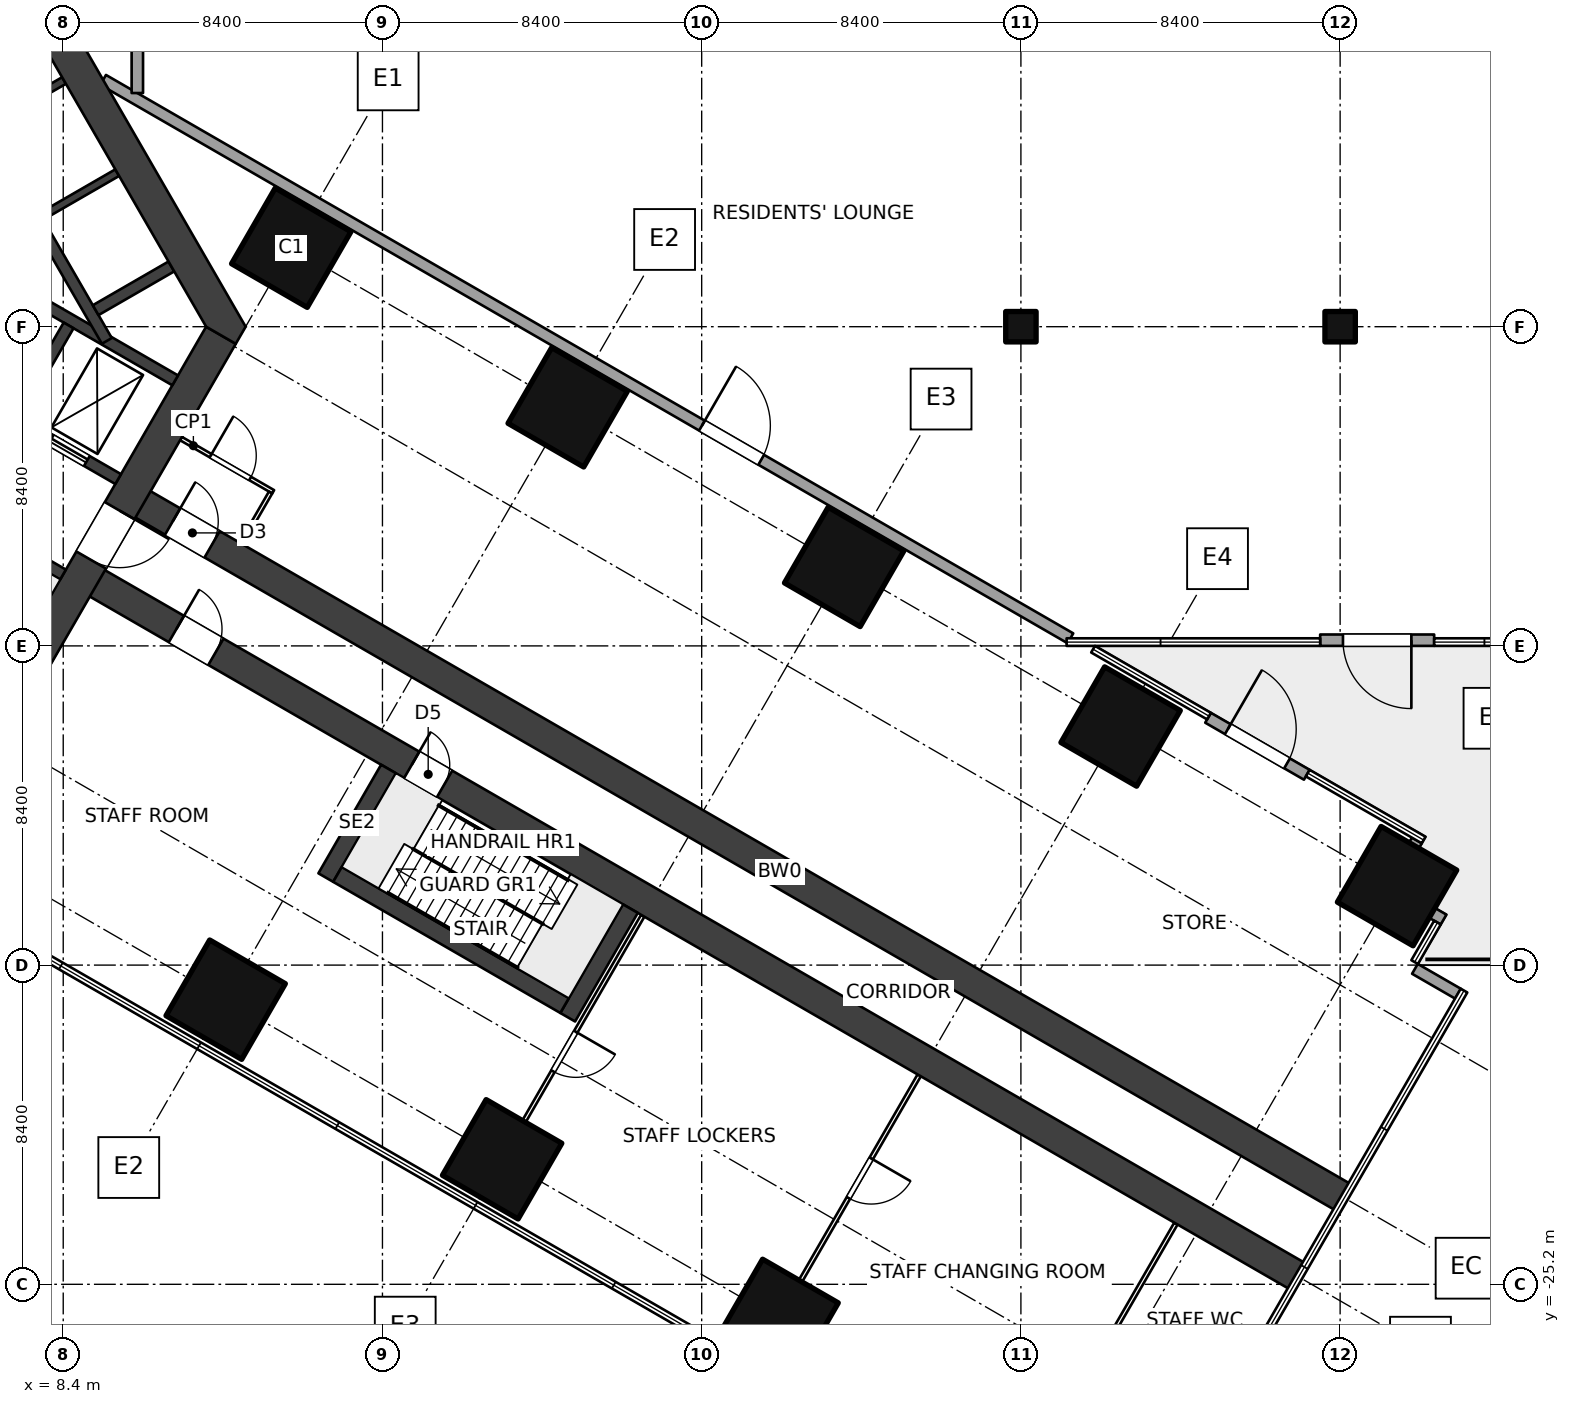
"""IFC4 building model, lengths in metres.
Left out: names, types, materials, properties, quantities, classifications, styles, units other than length and angle.
Written with IfcOpenShell. Run it as: python <this file> out.ifc"""

import sys

from ifc_helpers import new_model, si_unit, direction, frame, frame_2d, origin, origin_2d, place, context, subcontext, project, spatial, polyline, rectangle, outline, extrude, element, fill, save


model = new_model("IFC4")
c1 = context("Model", 3, precision=1e-05, world=origin(), true_north=direction((0.0, 1.0)))
c2 = subcontext(c1, "Body", "Model", "MODEL_VIEW")
j1 = project(units=[si_unit("LENGTHUNIT", "METRE"), si_unit("PLANEANGLEUNIT", "RADIAN")], contexts=[c1])
p1 = place(None, origin())
s1 = spatial("IfcSite", under=j1, at=p1, CompositionType="ELEMENT")
p2 = place(p1, origin())
s2 = spatial("IfcBuilding", under=s1, at=p2, CompositionType="ELEMENT")
p3 = place(p2, frame((0.0, 0.0, 21.0)))
s3 = spatial("IfcBuildingStorey", under=s2, at=p3, CompositionType="ELEMENT", Elevation=21.0)
for number, where, z_axis, x_axis in (
    (1, (14.4, 2.078, 0.0), (0.0, 0.0, 1.0), (-0.5, -0.866, 0.0)),
    (2, (21.675, -2.122, 0.0), (0.0, 0.0, 1.0), (-0.5, -0.866, 0.0)),
    (3, (12.675, -17.71, 0.0), (0.0, 0.0, 1.0), (-0.5, -0.866, 0.0)),
    (4, (28.949, -6.322, 0.0), (0.0, 0.0, 1.0), (-0.5, -0.866, 0.0)),
    (5, (19.949, -21.91, 0.0), (0.0, 0.0, 1.0), (-0.5, -0.866, 0.0)),
    (6, (36.224, -10.521, 0.0), (0.0, 0.0, 1.0), (-0.5, -0.866, 0.0)),
    (7, (27.224, -26.11, 0.0), (0.0, 0.0, 1.0), (-0.5, -0.866, 0.0)),
    (8, (43.499, -14.721, 0.0), (0.0, 0.0, 1.0), (-0.5, -0.866, 0.0)),
):
    element("IfcColumn", number, at=place(p3, frame(where, z_axis=z_axis, x_axis=x_axis)), inside=s3, PredefinedType="COLUMN", context=c2, shape_type="SweptSolid", body=[
        extrude(rectangle(XDim=2.3, YDim=2.3, at=origin_2d()), origin(), (0.0, 0.0, 1.0), 5.0),
    ])
for number, where, z_axis, x_axis in (
    (9, (33.6, 0.0, 0.0), (0.0, 0.0, 1.0), (1.0, 0.0, 0.0)),
    (10, (42.0, 0.0, 0.0), (0.0, 0.0, 1.0), (1.0, 0.0, 0.0)),
):
    element("IfcColumn", number, at=place(p3, frame(where, z_axis=z_axis, x_axis=x_axis)), inside=s3, PredefinedType="COLUMN", context=c2, shape_type="SweptSolid", body=[
        extrude(rectangle(XDim=0.8, YDim=0.8, at=origin_2d()), origin(), (0.0, 0.0, 1.0), 5.0),
    ])
p4 = place(p3, frame((12.551, -0.225, 0.0), z_axis=(0.0, 0.0, 1.0), x_axis=(-0.499997612506, -0.8660267822, 0.0)))
e11 = element("IfcWall", 11, at=p4, inside=s3, PredefinedType="SHEAR", context=c2, shape_type="SweptSolid", body=[
    extrude(rectangle(XDim=12.161, YDim=0.9, at=frame_2d((6.08, 0.0))), origin(), (0.0, 0.0, 1.0), 5.0),
])
p5 = place(p4, frame((5.33, 0.0, 0.0)))
e12 = element("IfcOpeningElement", 12, at=p5, cuts=e11, PredefinedType="OPENING", context=c2, shape_type="SweptSolid", body=[
    extrude(rectangle(XDim=1.5, YDim=2.1, at=frame_2d((0.75, 1.05))), frame((0.0, 0.46, 0.0), z_axis=(0.0, -1.0, 0.0), x_axis=(1.0, 0.0, 0.0)), (0.0, 0.0, 1.0), 0.92),
])
p6 = place(p3, origin())
e13 = element("IfcWall", 13, at=p6, inside=s3, PredefinedType="SHEAR", context=c2, shape_type="SweptSolid", body=[
    extrude(outline(polyline([(13.2, 0.0), (6.6, 11.432), (6.08, 11.432), (6.08, 10.531), (12.161, 0.0), (12.94, -0.45), (13.2, 0.0)])), origin(), (0.0, 0.0, 1.0), 5.0),
])
p7 = place(p3, frame((2.419, -3.071, 0.0), z_axis=(0.0, 0.0, 1.0), x_axis=(0.86602711848, -0.499997030048, 0.0)))
e14 = element("IfcWall", 14, at=p7, inside=s3, PredefinedType="SHEAR", context=c2, shape_type="SweptSolid", body=[
    extrude(rectangle(XDim=6.901, YDim=0.3, at=frame_2d((3.451, 0.0))), origin(), (0.0, 0.0, 1.0), 5.0),
])
p8 = place(p7, frame((0.25, 0.0, 0.0)))
e15 = element("IfcOpeningElement", 15, at=p8, cuts=e14, PredefinedType="OPENING", context=c2, shape_type="SweptSolid", body=[
    extrude(rectangle(XDim=1.0, YDim=2.1, at=frame_2d((0.5, 1.05))), frame((0.0, 0.16, 0.0), z_axis=(0.0, -1.0, 0.0), x_axis=(1.0, 0.0, 0.0)), (0.0, 0.0, 1.0), 0.32),
])
p9 = place(p3, frame((3.869, -0.559, 0.0), z_axis=(0.0, 0.0, 1.0), x_axis=(0.86602711848, -0.499997030048, 0.0)))
e16 = element("IfcWall", 16, at=p9, inside=s3, PredefinedType="SHEAR", context=c2, shape_type="SweptSolid", body=[
    extrude(rectangle(XDim=6.901, YDim=0.3, at=frame_2d((3.451, 0.0))), origin(), (0.0, 0.0, 1.0), 5.0),
])
p10 = place(p9, frame((4.85, 0.0, 0.0)))
e17 = element("IfcOpeningElement", 17, at=p10, cuts=e16, PredefinedType="OPENING", context=c2, shape_type="SweptSolid", body=[
    extrude(rectangle(XDim=1.1, YDim=2.1, at=frame_2d((0.55, 1.05))), frame((0.0, 0.16, 0.0), z_axis=(0.0, -1.0, 0.0), x_axis=(1.0, 0.0, 0.0)), (0.0, 0.0, 1.0), 0.32),
])
p11 = place(p3, frame((5.369, 2.039, 0.0), z_axis=(0.0, 0.0, 1.0), x_axis=(0.86602711848, -0.499997030048, 0.0)))
e18 = element("IfcWall", 18, at=p11, inside=s3, PredefinedType="SHEAR", context=c2, shape_type="SweptSolid", body=[
    extrude(rectangle(XDim=6.901, YDim=0.3, at=frame_2d((3.451, 0.0))), origin(), (0.0, 0.0, 1.0), 5.0),
])
p12 = place(p3, frame((8.541, 0.034, 0.0), z_axis=(0.0, 0.0, 1.0), x_axis=(-0.50000943426, -0.866019956843, 0.0)))
e19 = element("IfcWall", 19, at=p12, inside=s3, PredefinedType="SHEAR", context=c2, shape_type="SweptSolid", body=[
    extrude(rectangle(XDim=2.7, YDim=0.3, at=frame_2d((1.35, 0.0))), origin(), (0.0, 0.0, 1.0), 5.0),
])
p13 = place(p3, frame((4.45, 8.455, 0.0), z_axis=(0.0, 0.0, 1.0), x_axis=(0.500002290144, -0.866024081565, 0.0)))
e20 = element("IfcWall", 20, at=p13, inside=s3, PredefinedType="SHEAR", context=c2, shape_type="SweptSolid", body=[
    extrude(rectangle(XDim=10.195, YDim=0.3, at=frame_2d((5.098, 0.0))), origin(), (0.0, 0.0, 1.0), 5.0),
])
p14 = place(p3, frame((9.254, 0.435, 0.0), z_axis=(0.0, 0.0, 1.0), x_axis=(0.866007057882, 0.500031774688, 0.0)))
e21 = element("IfcWall", 21, at=p14, inside=s3, PredefinedType="SHEAR", context=c2, shape_type="SweptSolid", body=[
    extrude(rectangle(XDim=2.3, YDim=0.3, at=frame_2d((1.15, 0.0))), origin(), (0.0, 0.0, 1.0), 5.0),
])
for number, where, z_axis, x_axis in (
    (22, (6.429, 5.328, 0.0), (0.0, 0.0, 1.0), (0.866, 0.5, 0.0)),
    (23, (7.829, 2.903, 0.0), (0.0, 0.0, 1.0), (0.866, 0.5, 0.0)),
):
    element("IfcWall", number, at=place(p3, frame(where, z_axis=z_axis, x_axis=x_axis)), inside=s3, PredefinedType="SHEAR", context=c2, shape_type="SweptSolid", body=[
        extrude(rectangle(XDim=2.3, YDim=0.2, at=frame_2d((1.15, 0.0))), origin(), (0.0, 0.0, 1.0), 5.0),
    ])
p15 = place(p3, frame((10.11, -4.451, 0.0), z_axis=(0.0, 0.0, 1.0), x_axis=(0.866023348156, -0.500003560437, 0.0)))
e24 = element("IfcWall", 24, at=p15, inside=s3, PredefinedType="SHEAR", context=c2, shape_type="SweptSolid", body=[
    extrude(rectangle(XDim=36.888, YDim=0.8, at=frame_2d((18.444, 0.0))), origin(), (0.0, 0.0, 1.0), 5.0),
])
p16 = place(p15, frame((1.35, 0.0, 0.0)))
e25 = element("IfcOpeningElement", 25, at=p16, cuts=e24, PredefinedType="OPENING", context=c2, shape_type="SweptSolid", body=[
    extrude(rectangle(XDim=1.2, YDim=2.1, at=frame_2d((0.6, 1.05))), frame((0.0, 0.41, 0.0), z_axis=(0.0, -1.0, 0.0), x_axis=(1.0, 0.0, 0.0)), (0.0, 0.0, 1.0), 0.82),
])
p17 = place(p3, frame((8.91, -6.53, 0.0), z_axis=(0.0, 0.0, 1.0), x_axis=(0.866026214035, -0.499998596603, 0.0)))
e26 = element("IfcWall", 26, at=p17, inside=s3, PredefinedType="SHEAR", context=c2, shape_type="SweptSolid", body=[
    extrude(rectangle(XDim=36.888, YDim=0.8, at=frame_2d((18.444, 0.0))), origin(), (0.0, 0.0, 1.0), 5.0),
])
p18 = place(p17, frame((10.0, 0.0, 0.0)))
e27 = element("IfcOpeningElement", 27, at=p18, cuts=e26, PredefinedType="OPENING", context=c2, shape_type="SweptSolid", body=[
    extrude(rectangle(XDim=1.0, YDim=2.1, at=frame_2d((0.5, 1.05))), frame((0.0, 0.41, 0.0), z_axis=(0.0, -1.0, 0.0), x_axis=(1.0, 0.0, 0.0)), (0.0, 0.0, 1.0), 0.82),
])
p19 = place(p17, frame((2.85, 0.0, 0.0)))
e28 = element("IfcOpeningElement", 28, at=p19, cuts=e26, PredefinedType="OPENING", context=c2, shape_type="SweptSolid", body=[
    extrude(rectangle(XDim=1.2, YDim=2.1, at=frame_2d((0.6, 1.05))), frame((0.0, 0.41, 0.0), z_axis=(0.0, -1.0, 0.0), x_axis=(1.0, 0.0, 0.0)), (0.0, 0.0, 1.0), 0.82),
])
p20 = place(p3, frame((44.475, -8.25, 0.0), z_axis=(0.0, 0.0, 1.0), x_axis=(-1.0, 0.0, 0.0)))
e29 = element("IfcWall", 29, at=p20, inside=s3, PredefinedType="SOLIDWALL", context=c2, shape_type="SweptSolid", body=[
    extrude(rectangle(XDim=3.0, YDim=0.3, at=frame_2d((1.5, 0.0))), origin(), (0.0, 0.0, 1.0), 4.6),
])
p21 = place(p20, frame((0.6, 0.0, 0.0)))
e30 = element("IfcOpeningElement", 30, at=p21, cuts=e29, PredefinedType="OPENING", context=c2, shape_type="SweptSolid", body=[
    extrude(rectangle(XDim=1.8, YDim=2.4, at=frame_2d((0.9, 1.2))), frame((0.0, 0.16, 0.0), z_axis=(0.0, -1.0, 0.0), x_axis=(1.0, 0.0, 0.0)), (0.0, 0.0, 1.0), 0.32),
])
p22 = place(p3, frame((38.525, -10.291, 0.0), z_axis=(0.0, 0.0, 1.0), x_axis=(0.866010750942, -0.50002537861, 0.0)))
e31 = element("IfcWall", 31, at=p22, inside=s3, PredefinedType="SOLIDWALL", context=c2, shape_type="SweptSolid", body=[
    extrude(rectangle(XDim=3.0, YDim=0.3, at=frame_2d((1.5, 0.0))), origin(), (0.0, 0.0, 1.0), 4.6),
])
p23 = place(p22, frame((0.6, 0.0, 0.0)))
e32 = element("IfcOpeningElement", 32, at=p23, cuts=e31, PredefinedType="OPENING", context=c2, shape_type="SweptSolid", body=[
    extrude(rectangle(XDim=1.8, YDim=2.4, at=frame_2d((0.9, 1.2))), frame((0.0, 0.16, 0.0), z_axis=(0.0, -1.0, 0.0), x_axis=(1.0, 0.0, 0.0)), (0.0, 0.0, 1.0), 0.32),
])
p24 = place(p3, frame((44.021, -13.516, 0.0), z_axis=(0.0, 0.0, 1.0), x_axis=(-0.499953773667, -0.866052090925, 0.0)))
e33 = element("IfcWall", 33, at=p24, inside=s3, PredefinedType="SOLIDWALL", context=c2, shape_type="SweptSolid", body=[
    extrude(rectangle(XDim=1.005, YDim=0.3, at=frame_2d((0.502, 0.0))), origin(), (0.0, 0.0, 1.0), 4.6),
])
p25 = place(p3, frame((44.422, -15.428, 0.0), z_axis=(0.0, 0.0, 1.0), x_axis=(0.865939549016, -0.500148675346, 0.0)))
e34 = element("IfcWall", 34, at=p25, inside=s3, PredefinedType="SOLIDWALL", context=c2, shape_type="SweptSolid", body=[
    extrude(rectangle(XDim=0.347, YDim=0.3, at=frame_2d((0.174, 0.0))), origin(), (0.0, 0.0, 1.0), 4.6),
])
p26 = place(p3, frame((43.968, -16.898, 0.0), z_axis=(0.0, 0.0, 1.0), x_axis=(0.865974499684, -0.500088158126, 0.0)))
e35 = element("IfcWall", 35, at=p26, inside=s3, PredefinedType="SOLIDWALL", context=c2, shape_type="SweptSolid", body=[
    extrude(rectangle(XDim=1.31, YDim=0.3, at=frame_2d((0.655, 0.0))), origin(), (0.0, 0.0, 1.0), 4.6),
])
p27 = place(p3, frame((11.5, -2.945, 0.0), z_axis=(0.0, 0.0, 1.0), x_axis=(0.866034573852, -0.49998411664, 0.0)))
e36 = element("IfcWall", 36, at=p27, inside=s3, PredefinedType="PARTITIONING", context=c2, shape_type="SweptSolid", body=[
    extrude(rectangle(XDim=2.8, YDim=0.1, at=frame_2d((1.4, 0.0))), origin(), (0.0, 0.0, 1.0), 4.6),
])
p28 = place(p27, frame((0.9, 0.0, 0.0)))
e37 = element("IfcOpeningElement", 37, at=p28, cuts=e36, PredefinedType="OPENING", context=c2, shape_type="SweptSolid", body=[
    extrude(rectangle(XDim=1.2, YDim=2.1, at=frame_2d((0.6, 1.05))), frame((0.0, 0.06, 0.0), z_axis=(0.0, -1.0, 0.0), x_axis=(1.0, 0.0, 0.0)), (0.0, 0.0, 1.0), 0.12),
])
p29 = place(p3, frame((13.082, -5.705, 0.0), z_axis=(0.0, 0.0, 1.0), x_axis=(0.500086022567, 0.865975732936, 0.0)))
e38 = element("IfcWall", 38, at=p29, inside=s3, PredefinedType="PARTITIONING", context=c2, shape_type="SweptSolid", body=[
    extrude(rectangle(XDim=1.55, YDim=0.1, at=frame_2d((0.775, 0.0))), origin(), (0.0, 0.0, 1.0), 4.6),
])
p30 = place(p3, frame((23.649, -15.501, 0.0), z_axis=(0.0, 0.0, 1.0), x_axis=(-0.500004234368, -0.866022959057, 0.0)))
e39 = element("IfcWall", 39, at=p30, inside=s3, PredefinedType="PARTITIONING", context=c2, shape_type="SweptSolid", body=[
    extrude(rectangle(XDim=6.25, YDim=0.1, at=frame_2d((3.125, 0.0))), origin(), (0.0, 0.0, 1.0), 2.8),
])
p31 = place(p30, frame((3.525, 0.0, 0.0)))
e40 = element("IfcOpeningElement", 40, at=p31, cuts=e39, PredefinedType="OPENING", context=c2, shape_type="SweptSolid", body=[
    extrude(rectangle(XDim=1.2, YDim=2.1, at=frame_2d((0.6, 1.05))), frame((0.0, 0.06, 0.0), z_axis=(0.0, -1.0, 0.0), x_axis=(1.0, 0.0, 0.0)), (0.0, 0.0, 1.0), 0.12),
])
p32 = place(p3, frame((30.924, -19.701, 0.0), z_axis=(0.0, 0.0, 1.0), x_axis=(-0.500004234368, -0.866022959057, 0.0)))
e41 = element("IfcWall", 41, at=p32, inside=s3, PredefinedType="PARTITIONING", context=c2, shape_type="SweptSolid", body=[
    extrude(rectangle(XDim=6.25, YDim=0.1, at=frame_2d((3.125, 0.0))), origin(), (0.0, 0.0, 1.0), 2.8),
])
p33 = place(p32, frame((2.525, 0.0, 0.0)))
e42 = element("IfcOpeningElement", 42, at=p33, cuts=e41, PredefinedType="OPENING", context=c2, shape_type="SweptSolid", body=[
    extrude(rectangle(XDim=1.2, YDim=2.1, at=frame_2d((0.6, 1.05))), frame((0.0, 0.06, 0.0), z_axis=(0.0, -1.0, 0.0), x_axis=(1.0, 0.0, 0.0)), (0.0, 0.0, 1.0), 0.12),
])
p34 = place(p3, frame((37.679, -23.601, 0.0), z_axis=(0.0, 0.0, 1.0), x_axis=(-0.499994284652, -0.866028703517, 0.0)))
e43 = element("IfcWall", 43, at=p34, inside=s3, PredefinedType="PARTITIONING", context=c2, shape_type="SweptSolid", body=[
    extrude(rectangle(XDim=4.25, YDim=0.1, at=frame_2d((2.125, 0.0))), origin(), (0.0, 0.0, 1.0), 2.8),
])
p35 = place(p3, frame((10.35, 6.149, 0.0), z_axis=(0.0, 0.0, 1.0), x_axis=(0.0, 1.0, 0.0)))
e44 = element("IfcWall", 44, at=p35, inside=s3, PredefinedType="SOLIDWALL", context=c2, shape_type="SweptSolid", body=[
    extrude(rectangle(XDim=41.883, YDim=0.3, at=frame_2d((20.941, 0.0))), origin(), (0.0, 0.0, 1.0), 4.6),
])
p36 = place(p35, frame((25.383, 0.0, 0.0)))
e45 = element("IfcOpeningElement", 45, at=p36, cuts=e44, PredefinedType="OPENING", context=c2, shape_type="SweptSolid", body=[
    extrude(rectangle(XDim=1.8, YDim=2.4, at=frame_2d((0.9, 1.2))), frame((0.0, 0.16, 0.0), z_axis=(0.0, -1.0, 0.0), x_axis=(1.0, 0.0, 0.0)), (0.0, 0.0, 1.0), 0.32),
])
p37 = place(p3, frame((9.45, 6.495, 0.0), z_axis=(0.0, 0.0, 1.0), x_axis=(0.866027750123, -0.499995936, 0.0)))
e46 = element("IfcWall", 46, at=p37, inside=s3, PredefinedType="SOLIDWALL", context=c2, shape_type="SweptSolid", body=[
    extrude(rectangle(XDim=29.39, YDim=0.3, at=frame_2d((14.695, 0.0))), origin(), (0.0, 0.0, 1.0), 4.6),
])
p38 = place(p37, frame((18.195, 0.0, 0.0)))
e47 = element("IfcOpeningElement", 47, at=p38, cuts=e46, PredefinedType="OPENING", context=c2, shape_type="SweptSolid", body=[
    extrude(rectangle(XDim=1.8, YDim=2.4, at=frame_2d((0.9, 1.2))), frame((0.0, 0.16, 0.0), z_axis=(0.0, -1.0, 0.0), x_axis=(1.0, 0.0, 0.0)), (0.0, 0.0, 1.0), 0.32),
])
for number, where, z_axis, x_axis in (
    (48, (16.959, -11.639, 0.0), (0.0, 0.0, 1.0), (-0.5, -0.866, 0.0)),
    (49, (23.324, -15.314, 0.0), (0.0, 0.0, 1.0), (-0.5, -0.866, 0.0)),
):
    element("IfcWall", number, at=place(p3, frame(where, z_axis=z_axis, x_axis=x_axis)), inside=s3, PredefinedType="SOLIDWALL", context=c2, shape_type="SweptSolid", body=[
        extrude(rectangle(XDim=3.3, YDim=0.45, at=frame_2d((1.65, 0.0))), origin(), (0.0, 0.0, 1.0), 5.0),
    ])
p39 = place(p3, frame((15.616, -14.415, 0.0), z_axis=(0.0, 0.0, 1.0), x_axis=(0.866028853923, -0.499994024137, 0.0)))
e50 = element("IfcWall", 50, at=p39, inside=s3, PredefinedType="SOLIDWALL", context=c2, shape_type="SweptSolid", body=[
    extrude(rectangle(XDim=6.9, YDim=0.45, at=frame_2d((3.45, 0.0))), origin(), (0.0, 0.0, 1.0), 5.0),
])
p40 = place(p21, origin())
e51 = element("IfcDoor", 51, at=p40, inside=s3, OperationType="DOUBLE_DOOR_SINGLE_SWING", PredefinedType="DOOR", context=c2, shape_type="SweptSolid", body=[
    extrude(rectangle(XDim=1.8, YDim=2.4, at=frame_2d((0.9, 1.2))), frame((0.0, 0.025, 0.0), z_axis=(0.0, -1.0, 0.0), x_axis=(1.0, 0.0, 0.0)), (0.0, 0.0, 1.0), 0.05),
])
fill(e30, e51)
p41 = place(p23, origin())
e52 = element("IfcDoor", 52, at=p41, inside=s3, OperationType="DOUBLE_DOOR_SINGLE_SWING", PredefinedType="DOOR", context=c2, shape_type="SweptSolid", body=[
    extrude(rectangle(XDim=1.8, YDim=2.4, at=frame_2d((0.9, 1.2))), frame((0.0, 0.025, 0.0), z_axis=(0.0, -1.0, 0.0), x_axis=(1.0, 0.0, 0.0)), (0.0, 0.0, 1.0), 0.05),
])
fill(e32, e52)
p42 = place(p10, origin())
e53 = element("IfcDoor", 53, at=p42, inside=s3, OperationType="DOUBLE_DOOR_SLIDING", PredefinedType="DOOR", context=c2, shape_type="SweptSolid", body=[
    extrude(rectangle(XDim=1.1, YDim=2.1, at=frame_2d((0.55, 1.05))), frame((0.0, 0.025, 0.0), z_axis=(0.0, -1.0, 0.0), x_axis=(1.0, 0.0, 0.0)), (0.0, 0.0, 1.0), 0.05),
])
fill(e17, e53)
p43 = place(p5, origin())
e54 = element("IfcDoor", 54, at=p43, inside=s3, OperationType="DOUBLE_DOOR_DOUBLE_SWING", PredefinedType="DOOR", context=c2, shape_type="SweptSolid", body=[
    extrude(rectangle(XDim=1.5, YDim=2.1, at=frame_2d((0.75, 1.05))), frame((0.0, 0.025, 0.0), z_axis=(0.0, -1.0, 0.0), x_axis=(1.0, 0.0, 0.0)), (0.0, 0.0, 1.0), 0.05),
])
fill(e12, e54)
p44 = place(p18, origin())
e55 = element("IfcDoor", 55, at=p44, inside=s3, OperationType="SINGLE_SWING_LEFT", PredefinedType="DOOR", context=c2, shape_type="SweptSolid", body=[
    extrude(rectangle(XDim=1.0, YDim=2.1, at=frame_2d((0.5, 1.05))), frame((0.0, 0.025, 0.0), z_axis=(0.0, -1.0, 0.0), x_axis=(1.0, 0.0, 0.0)), (0.0, 0.0, 1.0), 0.05),
])
fill(e27, e55)
p45 = place(p16, origin())
e56 = element("IfcDoor", 56, at=p45, inside=s3, OperationType="DOUBLE_SWING_LEFT", PredefinedType="DOOR", context=c2, shape_type="SweptSolid", body=[
    extrude(rectangle(XDim=1.2, YDim=2.1, at=frame_2d((0.6, 1.05))), frame((0.0, 0.025, 0.0), z_axis=(0.0, -1.0, 0.0), x_axis=(1.0, 0.0, 0.0)), (0.0, 0.0, 1.0), 0.05),
])
fill(e25, e56)
p46 = place(p28, origin())
e57 = element("IfcDoor", 57, at=p46, inside=s3, OperationType="DOUBLE_SWING_LEFT", PredefinedType="DOOR", context=c2, shape_type="SweptSolid", body=[
    extrude(rectangle(XDim=1.2, YDim=2.1, at=frame_2d((0.6, 1.05))), frame((0.0, 0.025, 0.0), z_axis=(0.0, -1.0, 0.0), x_axis=(1.0, 0.0, 0.0)), (0.0, 0.0, 1.0), 0.05),
])
fill(e37, e57)
p47 = place(p31, origin())
e58 = element("IfcDoor", 58, at=p47, inside=s3, OperationType="DOUBLE_SWING_LEFT", PredefinedType="DOOR", context=c2, shape_type="SweptSolid", body=[
    extrude(rectangle(XDim=1.2, YDim=2.1, at=frame_2d((0.6, 1.05))), frame((0.0, 0.025, 0.0), z_axis=(0.0, -1.0, 0.0), x_axis=(1.0, 0.0, 0.0)), (0.0, 0.0, 1.0), 0.05),
])
fill(e40, e58)
p48 = place(p33, origin())
e59 = element("IfcDoor", 59, at=p48, inside=s3, OperationType="DOUBLE_SWING_LEFT", PredefinedType="DOOR", context=c2, shape_type="SweptSolid", body=[
    extrude(rectangle(XDim=1.2, YDim=2.1, at=frame_2d((0.6, 1.05))), frame((0.0, 0.025, 0.0), z_axis=(0.0, -1.0, 0.0), x_axis=(1.0, 0.0, 0.0)), (0.0, 0.0, 1.0), 0.05),
])
fill(e42, e59)
p49 = place(p19, origin())
e60 = element("IfcDoor", 60, at=p49, inside=s3, OperationType="DOUBLE_SWING_LEFT", PredefinedType="DOOR", context=c2, shape_type="SweptSolid", body=[
    extrude(rectangle(XDim=1.2, YDim=2.1, at=frame_2d((0.6, 1.05))), frame((0.0, 0.025, 0.0), z_axis=(0.0, -1.0, 0.0), x_axis=(1.0, 0.0, 0.0)), (0.0, 0.0, 1.0), 0.05),
])
fill(e28, e60)
p50 = place(p38, origin())
e61 = element("IfcDoor", 61, at=p50, inside=s3, OperationType="DOUBLE_DOOR_DOUBLE_SWING", PredefinedType="DOOR", context=c2, shape_type="SweptSolid", body=[
    extrude(rectangle(XDim=1.8, YDim=2.4, at=frame_2d((0.9, 1.2))), frame((0.0, 0.025, 0.0), z_axis=(0.0, -1.0, 0.0), x_axis=(1.0, 0.0, 0.0)), (0.0, 0.0, 1.0), 0.05),
])
fill(e47, e61)
save(model, sys.argv[1])
